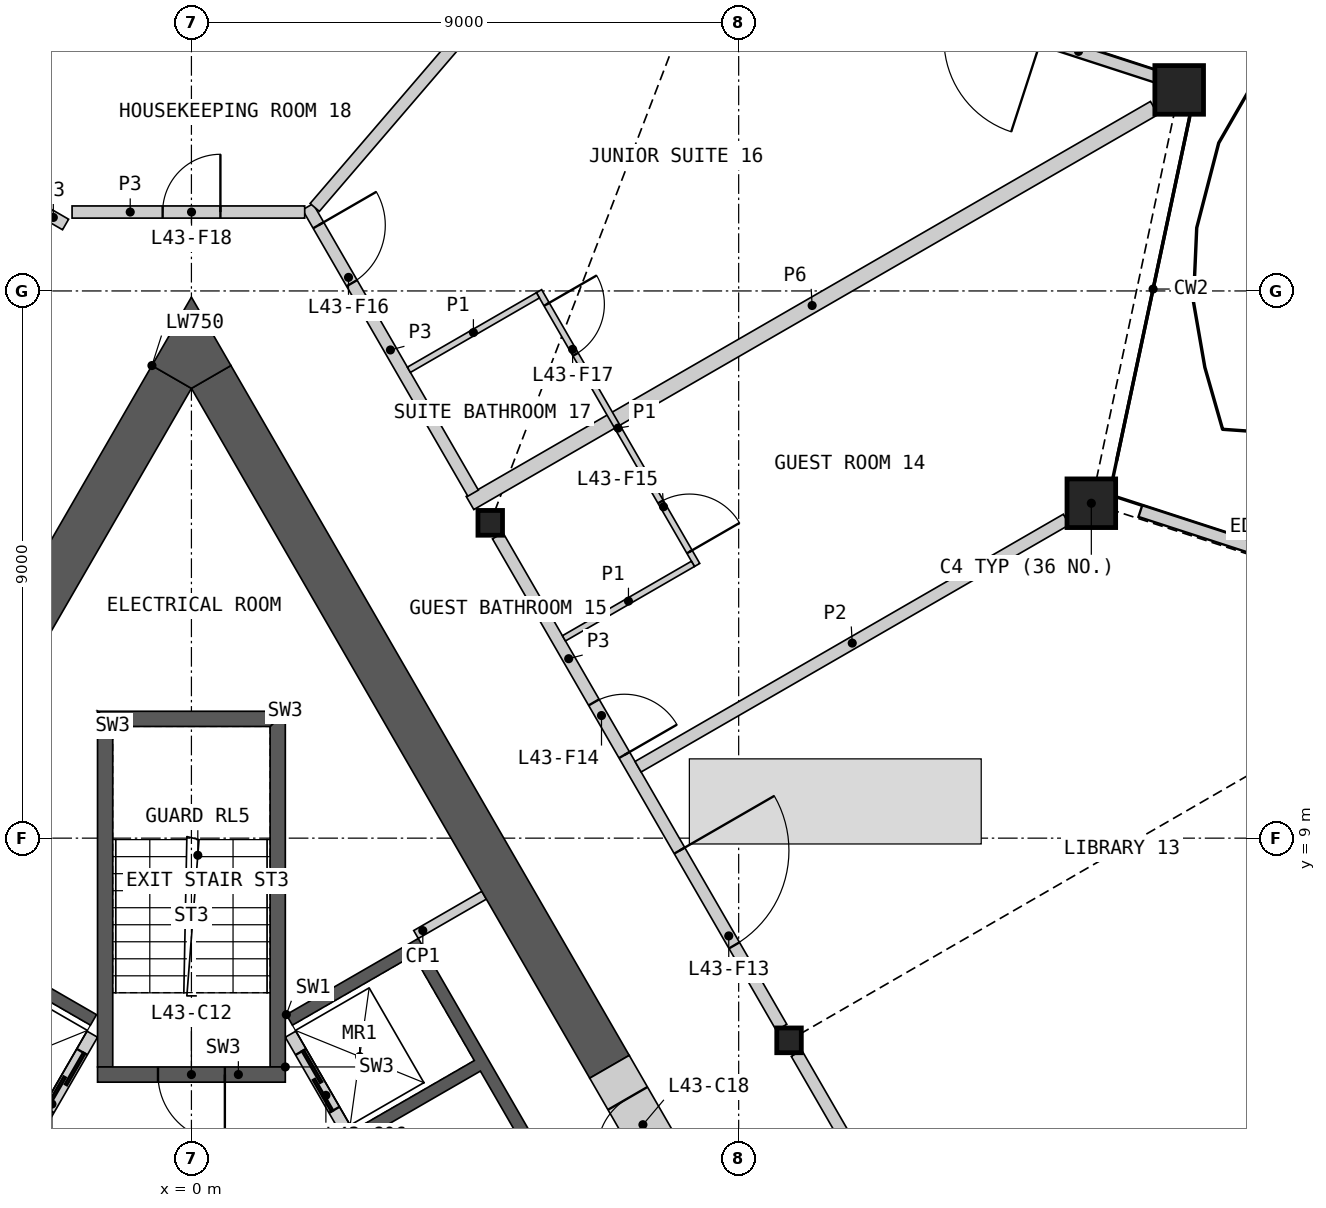
"""IFC4 building model, lengths in metres.
Left out: names, types, materials, properties, quantities, classifications, styles, units other than length and angle.
Written with IfcOpenShell. Run it as: python <this file> out.ifc"""

import sys

from ifc_helpers import new_model, si_unit, direction, frame, frame_2d, origin, origin_2d, place, context, subcontext, project, spatial, polyline, rectangle, hollow_rectangle, i_section, outline, extrude, element, fill, save


model = new_model("IFC4")
c1 = context("Model", 3, precision=1e-05, world=origin(), true_north=direction((0.0, 1.0)))
c2 = subcontext(c1, "Body", "Model", "MODEL_VIEW")
j1 = project(units=[si_unit("LENGTHUNIT", "METRE"), si_unit("PLANEANGLEUNIT", "RADIAN")], contexts=[c1])
p1 = place(None, origin())
s1 = spatial("IfcSite", under=j1, at=p1, CompositionType="ELEMENT")
p2 = place(p1, origin())
s2 = spatial("IfcBuilding", under=s1, at=p2, CompositionType="ELEMENT")
p3 = place(p2, frame((0.0, 0.0, 198.0)))
s3 = spatial("IfcBuildingStorey", under=s2, at=p3, CompositionType="ELEMENT", Elevation=198.0)
for number, where, z_axis, x_axis in (
    (1, (14.8, 14.508, 0.0), (0.0, 0.0, 1.0), (1.0, 0.0, 0.0)),
    (2, (16.245, 21.306, 0.0), (0.0, 0.0, 1.0), (1.0, 0.0, 0.0)),
):
    element("IfcColumn", number, at=place(p3, frame(where, z_axis=z_axis, x_axis=x_axis)), inside=s3, PredefinedType="COLUMN", context=c2, shape_type="SweptSolid", body=[
        extrude(hollow_rectangle(XDim=0.8, YDim=0.8, WallThickness=0.05, at=origin_2d()), origin(), (0.0, 0.0, 1.0), 3.6),
    ])
for number, where, z_axis, x_axis in (
    (3, (9.828, 5.675, 0.0), (0.0, 0.0, 1.0), (1.0, 0.0, 0.0)),
    (4, (4.914, 14.186, 0.0), (0.0, 0.0, 1.0), (1.0, 0.0, 0.0)),
):
    element("IfcColumn", number, at=place(p3, frame(where, z_axis=z_axis, x_axis=x_axis)), inside=s3, PredefinedType="COLUMN", context=c2, shape_type="SweptSolid", body=[
        extrude(i_section(OverallWidth=0.404, OverallDepth=0.407, WebThickness=0.027, FlangeThickness=0.044, at=origin_2d()), origin(), (0.0, 0.0, 1.0), 3.6),
    ])
p4 = place(p3, frame((21.102, 12.593, 0.0), z_axis=(0.0, 0.0, 1.0), x_axis=(-0.951059834965, 0.309006780371, 0.0)))
e5 = element("IfcWall", 5, at=p4, inside=s3, PredefinedType="SOLIDWALL", context=c2, shape_type="SweptSolid", body=[
    extrude(rectangle(XDim=5.779, YDim=0.2, at=frame_2d((2.889, 0.0))), origin(), (0.0, 0.0, 1.0), 2.701),
])
p5 = place(p4, frame((2.089, 0.0, 0.0)))
e6 = element("IfcOpeningElement", 6, at=p5, cuts=e5, PredefinedType="OPENING", context=c2, shape_type="SweptSolid", body=[
    extrude(rectangle(XDim=1.6, YDim=2.4, at=frame_2d((0.8, 1.2))), frame((0.0, 0.11, 0.0), z_axis=(0.0, -1.0, 0.0), x_axis=(1.0, 0.0, 0.0)), (0.0, 0.0, 1.0), 0.22),
])
p6 = place(p3, frame((15.963, 21.493, 0.0), z_axis=(0.0, 0.0, 1.0), x_axis=(-0.951059834965, 0.309006780371, 0.0)))
e7 = element("IfcWall", 7, at=p6, inside=s3, PredefinedType="SOLIDWALL", context=c2, shape_type="SweptSolid", body=[
    extrude(rectangle(XDim=5.779, YDim=0.2, at=frame_2d((2.889, 0.0))), origin(), (0.0, 0.0, 1.0), 2.701),
])
p7 = place(p6, frame((2.089, 0.0, 0.0)))
e8 = element("IfcOpeningElement", 8, at=p7, cuts=e7, PredefinedType="OPENING", context=c2, shape_type="SweptSolid", body=[
    extrude(rectangle(XDim=1.6, YDim=2.4, at=frame_2d((0.8, 1.2))), frame((0.0, 0.11, 0.0), z_axis=(0.0, -1.0, 0.0), x_axis=(1.0, 0.0, 0.0)), (0.0, 0.0, 1.0), 0.22),
])
p8 = place(p3, origin())
e9 = element("IfcWall", 9, at=p8, inside=s3, PredefinedType="SHEAR", context=c2, shape_type="SweptSolid", body=[
    extrude(outline(polyline([(1.561, 6.097), (3.731, 7.35), (8.231, -0.444), (6.061, -1.697), (5.96, -1.524), (7.952, -0.374), (4.752, 5.169), (2.76, 4.019), (2.66, 4.192), (4.652, 5.342), (3.652, 7.074), (1.66, 5.924), (1.561, 6.097)])), origin(), (0.0, 0.0, 1.0), 3.25),
])
p9 = place(p3, frame((5.817, -1.476, 0.0), z_axis=(0.0, 0.0, 1.0), x_axis=(-0.500002616675, 0.866023893041, 0.0)))
e10 = element("IfcWall", 10, at=p9, inside=s3, PredefinedType="SOLIDWALL", context=c2, shape_type="SweptSolid", body=[
    extrude(rectangle(XDim=8.373, YDim=0.2, at=frame_2d((4.187, 0.0))), origin(), (0.0, 0.0, 1.0), 3.25),
])
p10 = place(p9, frame((2.637, 0.0, 0.0)))
e11 = element("IfcOpeningElement", 11, at=p10, cuts=e10, PredefinedType="OPENING", context=c2, shape_type="SweptSolid", body=[
    extrude(rectangle(XDim=0.9, YDim=2.1, at=frame_2d((0.45, 1.05))), frame((0.0, 0.11, 0.0), z_axis=(0.0, -1.0, 0.0), x_axis=(1.0, 0.0, 0.0)), (0.0, 0.0, 1.0), 0.22),
])
p11 = place(p9, frame((6.937, 0.0, 0.0)))
e12 = element("IfcOpeningElement", 12, at=p11, cuts=e10, PredefinedType="OPENING", context=c2, shape_type="SweptSolid", body=[
    extrude(rectangle(XDim=1.1, YDim=2.1, at=frame_2d((0.55, 1.05))), frame((0.0, 0.11, 0.0), z_axis=(0.0, -1.0, 0.0), x_axis=(1.0, 0.0, 0.0)), (0.0, 0.0, 1.0), 0.22),
])
p12 = place(p3, origin())
e13 = element("IfcWall", 13, at=p12, inside=s3, PredefinedType="SHEAR", context=c2, shape_type="SweptSolid", body=[
    extrude(outline(polyline([(-4.96, 0.208), (-7.131, 1.461), (-3.731, 7.35), (-1.561, 6.097), (-1.66, 5.924), (-3.652, 7.074), (-4.652, 5.342), (-2.66, 4.192), (-2.76, 4.019), (-4.752, 5.169), (-5.752, 3.437), (-3.76, 2.287), (-3.861, 2.113), (-5.852, 3.263), (-6.852, 1.531), (-4.861, 0.381), (-4.96, 0.208)])), origin(), (0.0, 0.0, 1.0), 3.25),
])
p13 = place(p3, frame((-1.631, 5.776, 0.0), z_axis=(0.0, 0.0, 1.0), x_axis=(-0.499992876559, -0.866029516466, 0.0)))
e14 = element("IfcWall", 14, at=p13, inside=s3, PredefinedType="SOLIDWALL", context=c2, shape_type="SweptSolid", body=[
    extrude(rectangle(XDim=6.486, YDim=0.2, at=frame_2d((3.243, 0.0))), origin(), (0.0, 0.0, 1.0), 3.25),
])
p14 = place(p13, frame((0.337, 0.0, 0.0)))
e15 = element("IfcOpeningElement", 15, at=p14, cuts=e14, PredefinedType="OPENING", context=c2, shape_type="SweptSolid", body=[
    extrude(rectangle(XDim=1.1, YDim=2.1, at=frame_2d((0.55, 1.05))), frame((0.0, 0.11, 0.0), z_axis=(0.0, -1.0, 0.0), x_axis=(1.0, 0.0, 0.0)), (0.0, 0.0, 1.0), 0.22),
])
p15 = place(p13, frame((2.537, 0.0, 0.0)))
e16 = element("IfcOpeningElement", 16, at=p15, cuts=e14, PredefinedType="OPENING", context=c2, shape_type="SweptSolid", body=[
    extrude(rectangle(XDim=1.1, YDim=2.1, at=frame_2d((0.55, 1.05))), frame((0.0, 0.11, 0.0), z_axis=(0.0, -1.0, 0.0), x_axis=(1.0, 0.0, 0.0)), (0.0, 0.0, 1.0), 0.22),
])
p16 = place(p3, origin())
e17 = element("IfcWall", 17, at=p16, inside=s3, PredefinedType="SHEAR", context=c2, shape_type="SweptSolid", body=[
    extrude(outline(polyline([(1.544, 5.237), (1.544, 11.087), (1.294, 10.837), (1.294, 5.237), (1.544, 5.237)])), origin(), (0.0, 0.0, 1.0), 3.25),
])
p17 = place(p3, origin())
e18 = element("IfcWall", 18, at=p17, inside=s3, PredefinedType="SHEAR", context=c2, shape_type="SweptSolid", body=[
    extrude(outline(polyline([(1.544, 11.087), (-1.544, 11.087), (-1.294, 10.837), (1.294, 10.837), (1.544, 11.087)])), origin(), (0.0, 0.0, 1.0), 3.25),
])
p18 = place(p3, origin())
e19 = element("IfcWall", 19, at=p18, inside=s3, PredefinedType="SHEAR", context=c2, shape_type="SweptSolid", body=[
    extrude(outline(polyline([(-1.294, 10.837), (-1.544, 11.087), (-1.544, 5.237), (-1.294, 5.237), (-1.294, 10.837)])), origin(), (0.0, 0.0, 1.0), 3.25),
])
p19 = place(p3, frame((1.544, 5.112, 0.0), z_axis=(0.0, 0.0, 1.0), x_axis=(-1.0, 0.0, 0.0)))
e20 = element("IfcWall", 20, at=p19, inside=s3, PredefinedType="SHEAR", context=c2, shape_type="SweptSolid", body=[
    extrude(rectangle(XDim=3.088, YDim=0.25, at=frame_2d((1.544, 0.0))), origin(), (0.0, 0.0, 1.0), 3.25),
])
p20 = place(p19, frame((0.994, 0.0, 0.0)))
e21 = element("IfcOpeningElement", 21, at=p20, cuts=e20, PredefinedType="OPENING", context=c2, shape_type="SweptSolid", body=[
    extrude(rectangle(XDim=1.1, YDim=2.1, at=frame_2d((0.55, 1.05))), frame((0.0, 0.135, 0.0), z_axis=(0.0, -1.0, 0.0), x_axis=(1.0, 0.0, 0.0)), (0.0, 0.0, 1.0), 0.27),
])
p21 = place(p3, frame((3.693, 7.415, 0.0), z_axis=(0.0, 0.0, 1.0), x_axis=(0.866003189247, 0.500038474733, 0.0)))
e22 = element("IfcWall", 22, at=p21, inside=s3, PredefinedType="PARTITIONING", context=c2, shape_type="SweptSolid", body=[
    extrude(rectangle(XDim=1.293, YDim=0.15, at=frame_2d((0.646, 0.0))), origin(), (0.0, 0.0, 1.0), 3.25),
])
p22 = place(p3, frame((6.875, 5.24, 0.0), z_axis=(0.0, 0.0, 1.0), x_axis=(-0.499997217876, 0.866027010039, 0.0)))
e23 = element("IfcWall", 23, at=p22, inside=s3, PredefinedType="SHEAR", context=c2, shape_type="SweptSolid", body=[
    extrude(rectangle(XDim=13.101, YDim=0.75, at=frame_2d((6.551, 0.0))), origin(), (0.0, 0.0, 1.0), 3.25),
])
p23 = place(p3, frame((-0.325, 16.585, 0.0), z_axis=(0.0, 0.0, 1.0), x_axis=(-0.500012199891, -0.86601836006, 0.0)))
e24 = element("IfcWall", 24, at=p23, inside=s3, PredefinedType="SHEAR", context=c2, shape_type="SweptSolid", body=[
    extrude(rectangle(XDim=7.051, YDim=0.75, at=frame_2d((3.525, 0.0))), origin(), (0.0, 0.0, 1.0), 3.25),
])
p24 = place(p3, origin())
e25 = element("IfcWall", 25, at=p24, inside=s3, PredefinedType="SHEAR", context=c2, shape_type="SweptSolid", body=[
    extrude(outline(polyline([(-0.649, 16.773), (0.0, 17.898), (0.649, 16.773), (0.0, 16.398), (-0.649, 16.773)])), origin(), (0.0, 0.0, 1.0), 3.25),
])
p25 = place(p3, frame((7.975, 3.334, 0.0), z_axis=(0.0, 0.0, 1.0), x_axis=(-0.500077893725, 0.86598042715, 0.0)))
e26 = element("IfcWall", 26, at=p25, inside=s3, PredefinedType="SHEAR", context=c2, shape_type="SweptSolid", body=[
    extrude(rectangle(XDim=2.2, YDim=0.75, at=frame_2d((1.1, 0.0))), origin(), (0.0, 0.0, 1.0), 3.25),
])
p26 = place(p25, frame((0.6, 0.0, 0.0)))
e27 = element("IfcOpeningElement", 27, at=p26, cuts=e26, PredefinedType="OPENING", context=c2, shape_type="SweptSolid", body=[
    extrude(rectangle(XDim=1.0, YDim=2.1, at=frame_2d((0.5, 1.05))), frame((0.0, 0.385, 0.0), z_axis=(0.0, -1.0, 0.0), x_axis=(1.0, 0.0, 0.0)), (0.0, 0.0, 1.0), 0.77),
])
p27 = place(p3, frame((4.582, 14.512, 0.0), z_axis=(0.0, 0.0, 1.0), x_axis=(0.866027263711, 0.4999967785, 0.0)))
e28 = element("IfcWall", 28, at=p27, inside=s3, PredefinedType="PARTITIONING", context=c2, shape_type="SweptSolid", body=[
    extrude(rectangle(XDim=12.994, YDim=0.25, at=frame_2d((6.497, 0.0))), origin(), (0.0, 0.0, 1.0), 2.404),
])
p28 = place(p3, frame((5.038, 13.972, 0.0), z_axis=(0.0, 0.0, 1.0), x_axis=(0.50000393355, -0.866023132736, 0.0)))
e29 = element("IfcWall", 29, at=p28, inside=s3, PredefinedType="PARTITIONING", context=c2, shape_type="SweptSolid", body=[
    extrude(rectangle(XDim=9.335, YDim=0.2, at=frame_2d((4.667, 0.0))), origin(), (0.0, 0.0, 1.0), 3.25),
])
p29 = place(p28, frame((5.979, 0.0, 0.0)))
e30 = element("IfcOpeningElement", 30, at=p29, cuts=e29, PredefinedType="OPENING", context=c2, shape_type="SweptSolid", body=[
    extrude(rectangle(XDim=1.8, YDim=2.1, at=frame_2d((0.9, 1.05))), frame((0.0, 0.11, 0.0), z_axis=(0.0, -1.0, 0.0), x_axis=(1.0, 0.0, 0.0)), (0.0, 0.0, 1.0), 0.22),
])
p30 = place(p28, frame((3.163, 0.0, 0.0)))
e31 = element("IfcOpeningElement", 31, at=p30, cuts=e29, PredefinedType="OPENING", context=c2, shape_type="SweptSolid", body=[
    extrude(rectangle(XDim=1.0, YDim=2.1, at=frame_2d((0.5, 1.05))), frame((0.0, 0.11, 0.0), z_axis=(0.0, -1.0, 0.0), x_axis=(1.0, 0.0, 0.0)), (0.0, 0.0, 1.0), 0.22),
])
p31 = place(p3, frame((9.952, 5.461, 0.0), z_axis=(0.0, 0.0, 1.0), x_axis=(0.50000393355, -0.866023132736, 0.0)))
e32 = element("IfcWall", 32, at=p31, inside=s3, PredefinedType="PARTITIONING", context=c2, shape_type="SweptSolid", body=[
    extrude(rectangle(XDim=9.335, YDim=0.2, at=frame_2d((4.667, 0.0))), origin(), (0.0, 0.0, 1.0), 3.25),
])
p32 = place(p31, frame((5.172, 0.0, 0.0)))
e33 = element("IfcOpeningElement", 33, at=p32, cuts=e32, PredefinedType="OPENING", context=c2, shape_type="SweptSolid", body=[
    extrude(rectangle(XDim=1.0, YDim=2.1, at=frame_2d((0.5, 1.05))), frame((0.0, 0.11, 0.0), z_axis=(0.0, -1.0, 0.0), x_axis=(1.0, 0.0, 0.0)), (0.0, 0.0, 1.0), 0.22),
])
p33 = place(p3, frame((1.913, 19.385, 0.0), z_axis=(0.0, 0.0, 1.0), x_axis=(0.499972435384, -0.866041317638, 0.0)))
e34 = element("IfcWall", 34, at=p33, inside=s3, PredefinedType="PARTITIONING", context=c2, shape_type="SweptSolid", body=[
    extrude(rectangle(XDim=5.439, YDim=0.2, at=frame_2d((2.719, 0.0))), origin(), (0.0, 0.0, 1.0), 3.25),
])
p34 = place(p33, frame((0.351, 0.0, 0.0)))
e35 = element("IfcOpeningElement", 35, at=p34, cuts=e34, PredefinedType="OPENING", context=c2, shape_type="SweptSolid", body=[
    extrude(rectangle(XDim=1.1, YDim=2.1, at=frame_2d((0.55, 1.05))), frame((0.0, 0.11, 0.0), z_axis=(0.0, -1.0, 0.0), x_axis=(1.0, 0.0, 0.0)), (0.0, 0.0, 1.0), 0.22),
])
p35 = place(p3, frame((-1.963, 19.298, 0.0), z_axis=(0.0, 0.0, 1.0), x_axis=(1.0, 0.0, 0.0)))
e36 = element("IfcWall", 36, at=p35, inside=s3, PredefinedType="PARTITIONING", context=c2, shape_type="SweptSolid", body=[
    extrude(rectangle(XDim=3.826, YDim=0.2, at=frame_2d((1.913, 0.0))), origin(), (0.0, 0.0, 1.0), 3.25),
])
p36 = place(p35, frame((1.49, 0.0, 0.0)))
e37 = element("IfcOpeningElement", 37, at=p36, cuts=e36, PredefinedType="OPENING", context=c2, shape_type="SweptSolid", body=[
    extrude(rectangle(XDim=0.95, YDim=2.1, at=frame_2d((0.475, 1.05))), frame((0.0, 0.11, 0.0), z_axis=(0.0, -1.0, 0.0), x_axis=(1.0, 0.0, 0.0)), (0.0, 0.0, 1.0), 0.22),
])
p37 = place(p3, frame((-2.338, 19.248, 0.0), z_axis=(0.0, 0.0, 1.0), x_axis=(0.866395311824, -0.499358752451, 0.0)))
e38 = element("IfcWall", 38, at=p37, inside=s3, PredefinedType="PARTITIONING", context=c2, shape_type="SweptSolid", body=[
    extrude(rectangle(XDim=0.31, YDim=0.2, at=frame_2d((0.155, 0.0))), origin(), (0.0, 0.0, 1.0), 3.25),
])
p38 = place(p3, frame((2.028, 19.374, 0.0), z_axis=(0.0, 0.0, 1.0), x_axis=(0.651304244859, 0.758816697647, 0.0)))
e39 = element("IfcWall", 39, at=p38, inside=s3, PredefinedType="PARTITIONING", context=c2, shape_type="SweptSolid", body=[
    extrude(rectangle(XDim=13.795, YDim=0.2, at=frame_2d((6.897, 0.0))), origin(), (0.0, 0.0, 1.0), 2.404),
])
p39 = place(p3, frame((12.484, 1.274, 0.0), z_axis=(0.0, 0.0, 1.0), x_axis=(0.866026229868, 0.499998569178, 0.0)))
e40 = element("IfcWall", 40, at=p39, inside=s3, PredefinedType="PARTITIONING", context=c2, shape_type="SweptSolid", body=[
    extrude(rectangle(XDim=8.164, YDim=0.2, at=frame_2d((4.082, 0.0))), origin(), (0.0, 0.0, 1.0), 2.404),
])
p40 = place(p3, frame((7.346, 10.175, 0.0), z_axis=(0.0, 0.0, 1.0), x_axis=(0.86602913801, 0.499993532075, 0.0)))
e41 = element("IfcWall", 41, at=p40, inside=s3, PredefinedType="PARTITIONING", context=c2, shape_type="SweptSolid", body=[
    extrude(rectangle(XDim=8.134, YDim=0.2, at=frame_2d((4.067, 0.0))), origin(), (0.0, 0.0, 1.0), 2.404),
])
p41 = place(p3, frame((5.717, 17.996, 0.0), z_axis=(0.0, 0.0, 1.0), x_axis=(0.500027264788, -0.866009661879, 0.0)))
e42 = element("IfcWall", 42, at=p41, inside=s3, PredefinedType="PARTITIONING", context=c2, shape_type="SweptSolid", body=[
    extrude(rectangle(XDim=5.2, YDim=0.1, at=frame_2d((2.6, 0.0))), origin(), (0.0, 0.0, 1.0), 2.404),
])
p42 = place(p41, frame((4.0, 0.0, 0.0)))
e43 = element("IfcOpeningElement", 43, at=p42, cuts=e42, PredefinedType="OPENING", context=c2, shape_type="SweptSolid", body=[
    extrude(rectangle(XDim=0.95, YDim=2.1, at=frame_2d((0.475, 1.05))), frame((0.0, 0.06, 0.0), z_axis=(0.0, -1.0, 0.0), x_axis=(1.0, 0.0, 0.0)), (0.0, 0.0, 1.0), 0.12),
])
p43 = place(p41, frame((0.25, 0.0, 0.0)))
e44 = element("IfcOpeningElement", 44, at=p43, cuts=e42, PredefinedType="OPENING", context=c2, shape_type="SweptSolid", body=[
    extrude(rectangle(XDim=0.95, YDim=2.1, at=frame_2d((0.475, 1.05))), frame((0.0, 0.06, 0.0), z_axis=(0.0, -1.0, 0.0), x_axis=(1.0, 0.0, 0.0)), (0.0, 0.0, 1.0), 0.12),
])
p44 = place(p3, frame((3.576, 16.703, 0.0), z_axis=(0.0, 0.0, 1.0), x_axis=(0.866057815567, 0.499943856944, 0.0)))
e45 = element("IfcWall", 45, at=p44, inside=s3, PredefinedType="PARTITIONING", context=c2, shape_type="SweptSolid", body=[
    extrude(rectangle(XDim=2.45, YDim=0.1, at=frame_2d((1.225, 0.0))), origin(), (0.0, 0.0, 1.0), 2.404),
])
p45 = place(p3, frame((6.126, 12.286, 0.0), z_axis=(0.0, 0.0, 1.0), x_axis=(0.866014668023, 0.500018594424, 0.0)))
e46 = element("IfcWall", 46, at=p45, inside=s3, PredefinedType="PARTITIONING", context=c2, shape_type="SweptSolid", body=[
    extrude(rectangle(XDim=2.45, YDim=0.1, at=frame_2d((1.225, 0.0))), origin(), (0.0, 0.0, 1.0), 2.404),
])
p46 = place(p11, origin())
e47 = element("IfcDoor", 47, at=p46, inside=s3, OperationType="SLIDING_TO_LEFT", PredefinedType="DOOR", context=c2, shape_type="SweptSolid", body=[
    extrude(rectangle(XDim=1.1, YDim=2.1, at=frame_2d((0.55, 1.05))), frame((0.0, 0.025, 0.0), z_axis=(0.0, -1.0, 0.0), x_axis=(1.0, 0.0, 0.0)), (0.0, 0.0, 1.0), 0.05),
])
fill(e12, e47)
p47 = place(p14, origin())
e48 = element("IfcDoor", 48, at=p47, inside=s3, OperationType="SLIDING_TO_LEFT", PredefinedType="DOOR", context=c2, shape_type="SweptSolid", body=[
    extrude(rectangle(XDim=1.1, YDim=2.1, at=frame_2d((0.55, 1.05))), frame((0.0, 0.025, 0.0), z_axis=(0.0, -1.0, 0.0), x_axis=(1.0, 0.0, 0.0)), (0.0, 0.0, 1.0), 0.05),
])
fill(e15, e48)
p48 = place(p20, origin())
e49 = element("IfcDoor", 49, at=p48, inside=s3, OperationType="SINGLE_SWING_LEFT", PredefinedType="DOOR", context=c2, shape_type="SweptSolid", body=[
    extrude(rectangle(XDim=1.1, YDim=2.1, at=frame_2d((0.55, 1.05))), frame((0.0, 0.025, 0.0), z_axis=(0.0, -1.0, 0.0), x_axis=(1.0, 0.0, 0.0)), (0.0, 0.0, 1.0), 0.05),
])
fill(e21, e49)
p49 = place(p26, origin())
e50 = element("IfcDoor", 50, at=p49, inside=s3, OperationType="SINGLE_SWING_LEFT", PredefinedType="DOOR", context=c2, shape_type="SweptSolid", body=[
    extrude(rectangle(XDim=1.0, YDim=2.1, at=frame_2d((0.5, 1.05))), frame((0.0, 0.13, 0.0), z_axis=(0.0, -1.0, 0.0), x_axis=(1.0, 0.0, 0.0)), (0.0, 0.0, 1.0), 0.05),
])
fill(e27, e50)
p50 = place(p29, origin())
e51 = element("IfcDoor", 51, at=p50, inside=s3, OperationType="DOUBLE_DOOR_SINGLE_SWING", PredefinedType="DOOR", context=c2, shape_type="SweptSolid", body=[
    extrude(rectangle(XDim=1.8, YDim=2.1, at=frame_2d((0.9, 1.05))), frame((0.0, 0.025, 0.0), z_axis=(0.0, -1.0, 0.0), x_axis=(1.0, 0.0, 0.0)), (0.0, 0.0, 1.0), 0.05),
])
fill(e30, e51)
p51 = place(p30, origin())
e52 = element("IfcDoor", 52, at=p51, inside=s3, OperationType="SINGLE_SWING_RIGHT", PredefinedType="DOOR", context=c2, shape_type="SweptSolid", body=[
    extrude(rectangle(XDim=1.0, YDim=2.1, at=frame_2d((0.5, 1.05))), frame((0.0, 0.025, 0.0), z_axis=(0.0, -1.0, 0.0), x_axis=(1.0, 0.0, 0.0)), (0.0, 0.0, 1.0), 0.05),
])
fill(e31, e52)
p52 = place(p42, origin())
e53 = element("IfcDoor", 53, at=p52, inside=s3, OperationType="SINGLE_SWING_RIGHT", PredefinedType="DOOR", context=c2, shape_type="SweptSolid", body=[
    extrude(rectangle(XDim=0.95, YDim=2.1, at=frame_2d((0.475, 1.05))), frame((0.0, 0.025, 0.0), z_axis=(0.0, -1.0, 0.0), x_axis=(1.0, 0.0, 0.0)), (0.0, 0.0, 1.0), 0.05),
])
fill(e43, e53)
p53 = place(p34, origin())
e54 = element("IfcDoor", 54, at=p53, inside=s3, OperationType="SINGLE_SWING_LEFT", PredefinedType="DOOR", context=c2, shape_type="SweptSolid", body=[
    extrude(rectangle(XDim=1.1, YDim=2.1, at=frame_2d((0.55, 1.05))), frame((0.0, 0.025, 0.0), z_axis=(0.0, -1.0, 0.0), x_axis=(1.0, 0.0, 0.0)), (0.0, 0.0, 1.0), 0.05),
])
fill(e35, e54)
p54 = place(p43, origin())
e55 = element("IfcDoor", 55, at=p54, inside=s3, OperationType="SINGLE_SWING_LEFT", PredefinedType="DOOR", context=c2, shape_type="SweptSolid", body=[
    extrude(rectangle(XDim=0.95, YDim=2.1, at=frame_2d((0.475, 1.05))), frame((0.0, 0.025, 0.0), z_axis=(0.0, -1.0, 0.0), x_axis=(1.0, 0.0, 0.0)), (0.0, 0.0, 1.0), 0.05),
])
fill(e44, e55)
p55 = place(p36, origin())
e56 = element("IfcDoor", 56, at=p55, inside=s3, OperationType="SINGLE_SWING_RIGHT", PredefinedType="DOOR", context=c2, shape_type="SweptSolid", body=[
    extrude(rectangle(XDim=0.95, YDim=2.1, at=frame_2d((0.475, 1.05))), frame((0.0, 0.025, 0.0), z_axis=(0.0, -1.0, 0.0), x_axis=(1.0, 0.0, 0.0)), (0.0, 0.0, 1.0), 0.05),
])
fill(e37, e56)
save(model, sys.argv[1])
